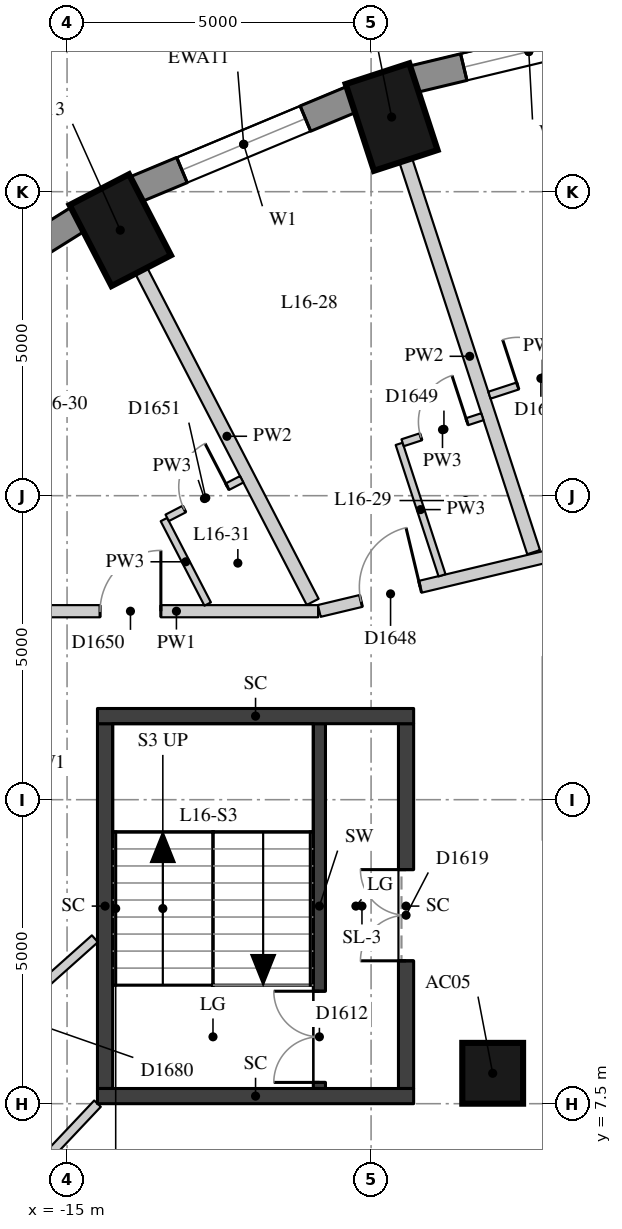
"""IFC4 building model, lengths in metres.
Left out: names, types, materials, properties, quantities, classifications, styles, units other than length and angle.
Written with IfcOpenShell. Run it as: python <this file> out.ifc"""

import sys

from ifc_helpers import new_model, si_unit, direction, frame, frame_2d, origin, origin_2d, place, context, subcontext, project, spatial, rectangle, extrude, element, fill, save


model = new_model("IFC4")
c1 = context("Model", 3, precision=1e-05, world=origin(), true_north=direction((0.0, 1.0)))
c2 = subcontext(c1, "Body", "Model", "MODEL_VIEW")
j1 = project(units=[si_unit("LENGTHUNIT", "METRE"), si_unit("PLANEANGLEUNIT", "RADIAN")], contexts=[c1])
p1 = place(None, origin())
s1 = spatial("IfcSite", under=j1, at=p1, CompositionType="ELEMENT")
p2 = place(p1, origin())
s2 = spatial("IfcBuilding", under=s1, at=p2, CompositionType="ELEMENT")
p3 = place(p2, frame((0.0, 0.0, 61.3)))
s3 = spatial("IfcBuildingStorey", under=s2, at=p3, CompositionType="ELEMENT", Elevation=61.3)
for number, where, z_axis, x_axis in (
    (1, (-9.662, 23.727, 0.0), (0.0, 0.0, 1.0), (-0.31, 0.951, 0.0)),
    (2, (-14.125, 21.867, 0.0), (0.0, 0.0, 1.0), (-0.46, 0.888, 0.0)),
):
    element("IfcColumn", number, at=place(p3, frame(where, z_axis=z_axis, x_axis=x_axis)), inside=s3, PredefinedType="COLUMN", context=c2, shape_type="SweptSolid", body=[
        extrude(rectangle(XDim=1.5, YDim=1.1, at=origin_2d()), origin(), (0.0, 0.0, 1.0), 3.3),
    ])
p4 = place(p3, frame((-8.0, 8.0, 0.0), z_axis=(0.0, 0.0, 1.0), x_axis=(1.0, 0.0, 0.0)))
e3 = element("IfcColumn", 3, at=p4, inside=s3, PredefinedType="COLUMN", context=c2, shape_type="SweptSolid", body=[
    extrude(rectangle(XDim=1.0, YDim=1.0, at=origin_2d()), origin(), (0.0, 0.0, 1.0), 3.3),
])
p5 = place(p3, frame((-5.504, 25.26, 0.0), z_axis=(0.0, 0.0, 1.0), x_axis=(-0.972496561493, -0.232917233979, 0.0)))
e4 = element("IfcWall", 4, at=p5, inside=s3, PredefinedType="SOLIDWALL", context=c2, shape_type="SweptSolid", body=[
    extrude(rectangle(XDim=3.911, YDim=0.45, at=frame_2d((1.956, 0.0))), origin(), (0.0, 0.0, 1.0), 3.02),
])
p6 = place(p5, frame((0.855, 0.0, 0.4)))
e5 = element("IfcOpeningElement", 5, at=p6, cuts=e4, PredefinedType="OPENING", context=c2, shape_type="SweptSolid", body=[
    extrude(rectangle(XDim=2.2, YDim=1.75, at=frame_2d((1.1, 0.875))), frame((0.0, 0.235, 0.0), z_axis=(0.0, -1.0, 0.0), x_axis=(1.0, 0.0, 0.0)), (0.0, 0.0, 1.0), 0.47),
])
p7 = place(p3, frame((-10.315, 24.021, 0.0), z_axis=(0.0, 0.0, 1.0), x_axis=(-0.923031964282, -0.384723267966, 0.0)))
e6 = element("IfcWall", 6, at=p7, inside=s3, PredefinedType="SOLIDWALL", context=c2, shape_type="SweptSolid", body=[
    extrude(rectangle(XDim=3.856, YDim=0.45, at=frame_2d((1.928, 0.0))), origin(), (0.0, 0.0, 1.0), 3.02),
])
p8 = place(p7, frame((0.828, 0.0, 0.4)))
e7 = element("IfcOpeningElement", 7, at=p8, cuts=e6, PredefinedType="OPENING", context=c2, shape_type="SweptSolid", body=[
    extrude(rectangle(XDim=2.2, YDim=1.75, at=frame_2d((1.1, 0.875))), frame((0.0, 0.235, 0.0), z_axis=(0.0, -1.0, 0.0), x_axis=(1.0, 0.0, 0.0)), (0.0, 0.0, 1.0), 0.47),
])
p9 = place(p3, frame((-14.817, 22.051, 0.0), z_axis=(0.0, 0.0, 1.0), x_axis=(-0.847635480093, -0.530579016629, 0.0)))
e8 = element("IfcWall", 8, at=p9, inside=s3, PredefinedType="SOLIDWALL", context=c2, shape_type="SweptSolid", body=[
    extrude(rectangle(XDim=3.782, YDim=0.45, at=frame_2d((1.891, 0.0))), origin(), (0.0, 0.0, 1.0), 3.02),
])
p10 = place(p9, frame((0.791, 0.0, 0.4)))
e9 = element("IfcOpeningElement", 9, at=p10, cuts=e8, PredefinedType="OPENING", context=c2, shape_type="SweptSolid", body=[
    extrude(rectangle(XDim=2.2, YDim=1.75, at=frame_2d((1.1, 0.875))), frame((0.0, 0.235, 0.0), z_axis=(0.0, -1.0, 0.0), x_axis=(1.0, 0.0, 0.0)), (0.0, 0.0, 1.0), 0.47),
])
p11 = place(p3, frame((-10.85, 7.75, 0.0), z_axis=(0.0, 0.0, 1.0), x_axis=(0.0, 1.0, 0.0)))
e10 = element("IfcWall", 10, at=p11, inside=s3, PredefinedType="SHEAR", context=c2, shape_type="SweptSolid", body=[
    extrude(rectangle(XDim=6.0, YDim=0.2, at=frame_2d((3.0, 0.0))), origin(), (0.0, 0.0, 1.0), 3.02),
])
p12 = place(p11, frame((0.1, 0.0, 0.0)))
e11 = element("IfcOpeningElement", 11, at=p12, cuts=e10, PredefinedType="OPENING", context=c2, shape_type="SweptSolid", body=[
    extrude(rectangle(XDim=1.5, YDim=2.1, at=frame_2d((0.75, 1.05))), frame((0.0, 0.11, 0.0), z_axis=(0.0, -1.0, 0.0), x_axis=(1.0, 0.0, 0.0)), (0.0, 0.0, 1.0), 0.22),
])
p13 = place(p3, frame((-14.375, 7.75, -0.28), z_axis=(0.0, 0.0, 1.0), x_axis=(0.0, 1.0, 0.0)))
e12 = element("IfcWall", 12, at=p13, inside=s3, PredefinedType="SHEAR", context=c2, shape_type="SweptSolid", body=[
    extrude(rectangle(XDim=6.0, YDim=0.25, at=frame_2d((3.0, 0.0))), origin(), (0.0, 0.0, 1.0), 3.3),
])
p14 = place(p3, frame((-9.425, 7.75, -0.28), z_axis=(0.0, 0.0, 1.0), x_axis=(0.0, 1.0, 0.0)))
e13 = element("IfcWall", 13, at=p14, inside=s3, PredefinedType="SHEAR", context=c2, shape_type="SweptSolid", body=[
    extrude(rectangle(XDim=6.0, YDim=0.25, at=frame_2d((3.0, 0.0))), origin(), (0.0, 0.0, 1.0), 3.3),
])
p15 = place(p14, frame((2.1, 0.0, 0.28)))
e14 = element("IfcOpeningElement", 14, at=p15, cuts=e13, PredefinedType="OPENING", context=c2, shape_type="SweptSolid", body=[
    extrude(rectangle(XDim=1.5, YDim=2.1, at=frame_2d((0.75, 1.05))), frame((0.0, 0.135, 0.0), z_axis=(0.0, -1.0, 0.0), x_axis=(1.0, 0.0, 0.0)), (0.0, 0.0, 1.0), 0.27),
])
for number, where, z_axis, x_axis in (
    (15, (-14.5, 13.875, -0.28), (0.0, 0.0, 1.0), (1.0, 0.0, 0.0)),
    (16, (-14.5, 7.625, -0.28), (0.0, 0.0, 1.0), (1.0, 0.0, 0.0)),
):
    element("IfcWall", number, at=place(p3, frame(where, z_axis=z_axis, x_axis=x_axis)), inside=s3, PredefinedType="SHEAR", context=c2, shape_type="SweptSolid", body=[
        extrude(rectangle(XDim=5.2, YDim=0.25, at=frame_2d((2.6, 0.0))), origin(), (0.0, 0.0, 1.0), 3.3),
    ])
p16 = place(p3, frame((-15.531, 15.6, 0.0), z_axis=(0.0, 0.0, 1.0), x_axis=(1.0, 0.0, 0.0)))
e17 = element("IfcWall", 17, at=p16, inside=s3, PredefinedType="PARTITIONING", context=c2, shape_type="SweptSolid", body=[
    extrude(rectangle(XDim=4.66, YDim=0.2, at=frame_2d((2.33, 0.0))), origin(), (0.0, 0.0, 1.0), 3.02),
])
p17 = place(p16, frame((1.074, 0.0, 0.0)))
e18 = element("IfcOpeningElement", 18, at=p17, cuts=e17, PredefinedType="OPENING", context=c2, shape_type="SweptSolid", body=[
    extrude(rectangle(XDim=1.0, YDim=2.1, at=frame_2d((0.5, 1.05))), frame((0.0, 0.11, 0.0), z_axis=(0.0, -1.0, 0.0), x_axis=(1.0, 0.0, 0.0)), (0.0, 0.0, 1.0), 0.22),
])
p18 = place(p3, frame((-10.852, 15.605, 0.0), z_axis=(0.0, 0.0, 1.0), x_axis=(0.972573296372, 0.232596610431, 0.0)))
e19 = element("IfcWall", 19, at=p18, inside=s3, PredefinedType="PARTITIONING", context=c2, shape_type="SweptSolid", body=[
    extrude(rectangle(XDim=11.157, YDim=0.2, at=frame_2d((5.579, 0.0))), origin(), (0.0, 0.0, 1.0), 3.02),
])
p19 = place(p18, frame((6.029, 0.0, 0.0)))
e20 = element("IfcOpeningElement", 20, at=p19, cuts=e19, PredefinedType="OPENING", context=c2, shape_type="SweptSolid", body=[
    extrude(rectangle(XDim=1.1, YDim=2.1, at=frame_2d((0.55, 1.05))), frame((0.0, 0.11, 0.0), z_axis=(0.0, -1.0, 0.0), x_axis=(1.0, 0.0, 0.0)), (0.0, 0.0, 1.0), 0.22),
])
p20 = place(p18, frame((0.705, 0.0, 0.0)))
e21 = element("IfcOpeningElement", 21, at=p20, cuts=e19, PredefinedType="OPENING", context=c2, shape_type="SweptSolid", body=[
    extrude(rectangle(XDim=1.0, YDim=2.1, at=frame_2d((0.5, 1.05))), frame((0.0, 0.11, 0.0), z_axis=(0.0, -1.0, 0.0), x_axis=(1.0, 0.0, 0.0)), (0.0, 0.0, 1.0), 0.22),
])
p21 = place(p3, frame((-14.499, 7.501, 0.0), z_axis=(0.0, 0.0, 1.0), x_axis=(-0.686403699782, -0.727220709913, 0.0)))
e22 = element("IfcWall", 22, at=p21, inside=s3, PredefinedType="PARTITIONING", context=c2, shape_type="SweptSolid", body=[
    extrude(rectangle(XDim=6.915, YDim=0.15, at=frame_2d((3.457, 0.0))), origin(), (0.0, 0.0, 1.0), 3.02),
])
p22 = place(p3, frame((-17.185, 7.856, 0.0), z_axis=(0.0, 0.0, 1.0), x_axis=(0.746480516634, 0.665407272493, 0.0)))
e23 = element("IfcWall", 23, at=p22, inside=s3, PredefinedType="PARTITIONING", context=c2, shape_type="SweptSolid", body=[
    extrude(rectangle(XDim=3.541, YDim=0.15, at=frame_2d((1.771, 0.0))), origin(), (0.0, 0.0, 1.0), 3.02),
])
p23 = place(p22, frame((1.221, 0.0, 0.0)))
e24 = element("IfcOpeningElement", 24, at=p23, cuts=e23, PredefinedType="OPENING", context=c2, shape_type="SweptSolid", body=[
    extrude(rectangle(XDim=0.9, YDim=2.1, at=frame_2d((0.45, 1.05))), frame((0.0, 0.085, 0.0), z_axis=(0.0, -1.0, 0.0), x_axis=(1.0, 0.0, 0.0)), (0.0, 0.0, 1.0), 0.17),
])
p24 = place(p3, frame((-9.429, 23.014, 0.0), z_axis=(0.0, 0.0, 1.0), x_axis=(0.310223739243, -0.950663574357, 0.0)))
e25 = element("IfcWall", 25, at=p24, inside=s3, PredefinedType="PARTITIONING", context=c2, shape_type="SweptSolid", body=[
    extrude(rectangle(XDim=6.778, YDim=0.22, at=frame_2d((3.389, 0.0))), origin(), (0.0, 0.0, 1.0), 3.02),
])
p25 = place(p3, frame((-13.78, 21.201, 0.0), z_axis=(0.0, 0.0, 1.0), x_axis=(0.459699000582, -0.888074787878, 0.0)))
e26 = element("IfcWall", 26, at=p25, inside=s3, PredefinedType="PARTITIONING", context=c2, shape_type="SweptSolid", body=[
    extrude(rectangle(XDim=6.134, YDim=0.22, at=frame_2d((3.067, 0.0))), origin(), (0.0, 0.0, 1.0), 3.02),
])
p26 = place(p3, frame((-8.833, 16.19, 0.0), z_axis=(0.0, 0.0, 1.0), x_axis=(-0.310231525188, 0.950661033586, 0.0)))
e27 = element("IfcWall", 27, at=p26, inside=s3, PredefinedType="PARTITIONING", context=c2, shape_type="SweptSolid", body=[
    extrude(rectangle(XDim=2.274, YDim=0.12, at=frame_2d((1.137, 0.0))), origin(), (0.0, 0.0, 1.0), 3.02),
])
p27 = place(p3, frame((-12.687, 15.718, 0.0), z_axis=(0.0, 0.0, 1.0), x_axis=(-0.459775159711, 0.888035361071, 0.0)))
e28 = element("IfcWall", 28, at=p27, inside=s3, PredefinedType="PARTITIONING", context=c2, shape_type="SweptSolid", body=[
    extrude(rectangle(XDim=1.565, YDim=0.12, at=frame_2d((0.782, 0.0))), origin(), (0.0, 0.0, 1.0), 3.02),
])
p28 = place(p3, frame((-6.314, 19.72, 0.0), z_axis=(0.0, 0.0, 1.0), x_axis=(-0.950639191072, -0.310298450524, 0.0)))
e29 = element("IfcWall", 29, at=p28, inside=s3, PredefinedType="PARTITIONING", context=c2, shape_type="SweptSolid", body=[
    extrude(rectangle(XDim=1.83, YDim=0.12, at=frame_2d((0.915, 0.0))), origin(), (0.0, 0.0, 1.0), 3.02),
])
p29 = place(p28, frame((0.54, 0.0, 0.0)))
e30 = element("IfcOpeningElement", 30, at=p29, cuts=e29, PredefinedType="OPENING", context=c2, shape_type="SweptSolid", body=[
    extrude(rectangle(XDim=0.8, YDim=2.1, at=frame_2d((0.4, 1.05))), frame((0.0, 0.07, 0.0), z_axis=(0.0, -1.0, 0.0), x_axis=(1.0, 0.0, 0.0)), (0.0, 0.0, 1.0), 0.14),
])
p30 = place(p3, frame((-9.481, 18.371, 0.0), z_axis=(0.0, 0.0, 1.0), x_axis=(0.950576687533, 0.310489872812, 0.0)))
e31 = element("IfcWall", 31, at=p30, inside=s3, PredefinedType="PARTITIONING", context=c2, shape_type="SweptSolid", body=[
    extrude(rectangle(XDim=1.38, YDim=0.12, at=frame_2d((0.69, 0.0))), origin(), (0.0, 0.0, 1.0), 3.02),
])
p31 = place(p30, frame((0.315, 0.0, 0.0)))
e32 = element("IfcOpeningElement", 32, at=p31, cuts=e31, PredefinedType="OPENING", context=c2, shape_type="SweptSolid", body=[
    extrude(rectangle(XDim=0.8, YDim=2.1, at=frame_2d((0.4, 1.05))), frame((0.0, 0.07, 0.0), z_axis=(0.0, -1.0, 0.0), x_axis=(1.0, 0.0, 0.0)), (0.0, 0.0, 1.0), 0.14),
])
p32 = place(p3, frame((-13.353, 17.135, 0.0), z_axis=(0.0, 0.0, 1.0), x_axis=(0.888075681402, 0.459697274413, 0.0)))
e33 = element("IfcWall", 33, at=p32, inside=s3, PredefinedType="PARTITIONING", context=c2, shape_type="SweptSolid", body=[
    extrude(rectangle(XDim=1.38, YDim=0.12, at=frame_2d((0.69, 0.0))), origin(), (0.0, 0.0, 1.0), 3.02),
])
p33 = place(p32, frame((0.315, 0.0, 0.0)))
e34 = element("IfcOpeningElement", 34, at=p33, cuts=e33, PredefinedType="OPENING", context=c2, shape_type="SweptSolid", body=[
    extrude(rectangle(XDim=0.8, YDim=2.1, at=frame_2d((0.4, 1.05))), frame((0.0, 0.07, 0.0), z_axis=(0.0, -1.0, 0.0), x_axis=(1.0, 0.0, 0.0)), (0.0, 0.0, 1.0), 0.14),
])
p34 = place(p6, origin())
e35 = element("IfcWindow", 35, at=p34, inside=s3, PartitioningType="SINGLE_PANEL", PredefinedType="WINDOW", context=c2, shape_type="SweptSolid", body=[
    extrude(rectangle(XDim=2.2, YDim=1.75, at=frame_2d((1.1, 0.875))), frame((0.0, 0.035, 0.0), z_axis=(0.0, -1.0, 0.0), x_axis=(1.0, 0.0, 0.0)), (0.0, 0.0, 1.0), 0.06),
])
fill(e5, e35)
p35 = place(p8, origin())
e36 = element("IfcWindow", 36, at=p35, inside=s3, PartitioningType="SINGLE_PANEL", PredefinedType="WINDOW", context=c2, shape_type="SweptSolid", body=[
    extrude(rectangle(XDim=2.2, YDim=1.75, at=frame_2d((1.1, 0.875))), frame((0.0, 0.035, 0.0), z_axis=(0.0, -1.0, 0.0), x_axis=(1.0, 0.0, 0.0)), (0.0, 0.0, 1.0), 0.06),
])
fill(e7, e36)
p36 = place(p12, origin())
e37 = element("IfcDoor", 37, at=p36, inside=s3, OperationType="DOUBLE_DOOR_SINGLE_SWING", PredefinedType="DOOR", context=c2, shape_type="SweptSolid", body=[
    extrude(rectangle(XDim=1.5, YDim=2.1, at=frame_2d((0.75, 1.05))), frame((0.0, 0.025, 0.0), z_axis=(0.0, -1.0, 0.0), x_axis=(1.0, 0.0, 0.0)), (0.0, 0.0, 1.0), 0.05),
])
fill(e11, e37)
p37 = place(p15, origin())
e38 = element("IfcDoor", 38, at=p37, inside=s3, OperationType="DOUBLE_DOOR_SINGLE_SWING", PredefinedType="DOOR", context=c2, shape_type="SweptSolid", body=[
    extrude(rectangle(XDim=1.5, YDim=2.1, at=frame_2d((0.75, 1.05))), frame((0.0, 0.025, 0.0), z_axis=(0.0, -1.0, 0.0), x_axis=(1.0, 0.0, 0.0)), (0.0, 0.0, 1.0), 0.05),
])
fill(e14, e38)
p38 = place(p29, origin())
e39 = element("IfcDoor", 39, at=p38, inside=s3, OperationType="SINGLE_SWING_LEFT", PredefinedType="DOOR", context=c2, shape_type="SweptSolid", body=[
    extrude(rectangle(XDim=0.8, YDim=2.1, at=frame_2d((0.4, 1.05))), frame((0.0, 0.025, 0.0), z_axis=(0.0, -1.0, 0.0), x_axis=(1.0, 0.0, 0.0)), (0.0, 0.0, 1.0), 0.05),
])
fill(e30, e39)
p39 = place(p20, origin())
e40 = element("IfcDoor", 40, at=p39, inside=s3, OperationType="SINGLE_SWING_RIGHT", PredefinedType="DOOR", context=c2, shape_type="SweptSolid", body=[
    extrude(rectangle(XDim=1.0, YDim=2.1, at=frame_2d((0.5, 1.05))), frame((0.0, 0.025, 0.0), z_axis=(0.0, -1.0, 0.0), x_axis=(1.0, 0.0, 0.0)), (0.0, 0.0, 1.0), 0.05),
])
fill(e21, e40)
p40 = place(p31, origin())
e41 = element("IfcDoor", 41, at=p40, inside=s3, OperationType="SINGLE_SWING_RIGHT", PredefinedType="DOOR", context=c2, shape_type="SweptSolid", body=[
    extrude(rectangle(XDim=0.8, YDim=2.1, at=frame_2d((0.4, 1.05))), frame((0.0, 0.025, 0.0), z_axis=(0.0, -1.0, 0.0), x_axis=(1.0, 0.0, 0.0)), (0.0, 0.0, 1.0), 0.05),
])
fill(e32, e41)
p41 = place(p17, origin())
e42 = element("IfcDoor", 42, at=p41, inside=s3, OperationType="SINGLE_SWING_RIGHT", PredefinedType="DOOR", context=c2, shape_type="SweptSolid", body=[
    extrude(rectangle(XDim=1.0, YDim=2.1, at=frame_2d((0.5, 1.05))), frame((0.0, 0.025, 0.0), z_axis=(0.0, -1.0, 0.0), x_axis=(1.0, 0.0, 0.0)), (0.0, 0.0, 1.0), 0.05),
])
fill(e18, e42)
p42 = place(p33, origin())
e43 = element("IfcDoor", 43, at=p42, inside=s3, OperationType="SINGLE_SWING_RIGHT", PredefinedType="DOOR", context=c2, shape_type="SweptSolid", body=[
    extrude(rectangle(XDim=0.8, YDim=2.1, at=frame_2d((0.4, 1.05))), frame((0.0, 0.025, 0.0), z_axis=(0.0, -1.0, 0.0), x_axis=(1.0, 0.0, 0.0)), (0.0, 0.0, 1.0), 0.05),
])
fill(e34, e43)
save(model, sys.argv[1])
